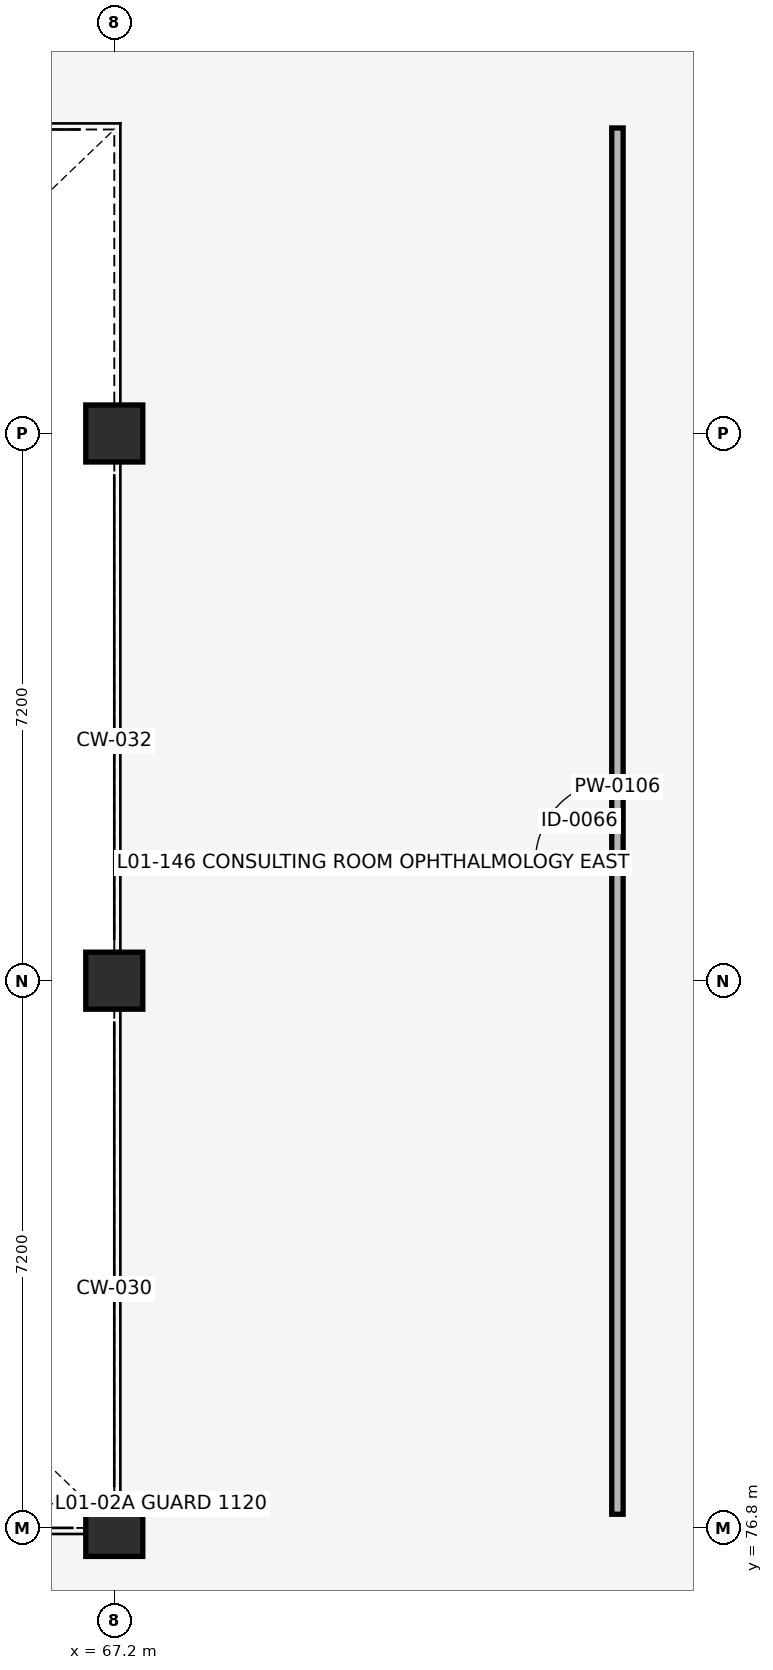
"""IFC4 building model, lengths in metres.
Left out: names, types, materials, properties, quantities, classifications, styles, units other than length and angle.
Written with IfcOpenShell. Run it as: python <this file> out.ifc"""

import sys

from ifc_helpers import new_model, si_unit, direction, frame, frame_2d, origin, origin_2d, place, context, subcontext, project, spatial, rectangle, extrude, element, fill, save


model = new_model("IFC4")
c1 = context("Model", 3, precision=1e-05, world=origin(), true_north=direction((0.0, 1.0)))
c2 = subcontext(c1, "Body", "Model", "MODEL_VIEW")
j1 = project(units=[si_unit("LENGTHUNIT", "METRE"), si_unit("PLANEANGLEUNIT", "RADIAN")], contexts=[c1])
p1 = place(None, origin())
s1 = spatial("IfcSite", under=j1, at=p1, CompositionType="ELEMENT")
p2 = place(p1, origin())
s2 = spatial("IfcBuilding", under=s1, at=p2, CompositionType="ELEMENT")
p3 = place(p2, frame((0.0, 0.0, 4.42)))
s3 = spatial("IfcBuildingStorey", under=s2, at=p3, CompositionType="ELEMENT", Elevation=4.42)
for number, where, z_axis, x_axis in (
    (1, (67.2, 76.8, 0.0), (0.0, 0.0, 1.0), (1.0, 0.0, 0.0)),
    (2, (67.2, 84.0, 0.0), (0.0, 0.0, 1.0), (1.0, 0.0, 0.0)),
    (3, (67.2, 91.2, 0.0), (0.0, 0.0, 1.0), (1.0, 0.0, 0.0)),
):
    element("IfcColumn", number, at=place(p3, frame(where, z_axis=z_axis, x_axis=x_axis)), inside=s3, PredefinedType="COLUMN", context=c2, shape_type="SweptSolid", body=[
        extrude(rectangle(XDim=0.75, YDim=0.75, at=origin_2d()), origin(), (0.0, 0.0, 1.0), 4.08),
    ])
p4 = place(p3, frame((73.82, 76.98, 0.0), z_axis=(0.0, 0.0, 1.0), x_axis=(0.0, 1.0, 0.0)))
e4 = element("IfcWall", 4, at=p4, inside=s3, PredefinedType="PARTITIONING", context=c2, shape_type="SweptSolid", body=[
    extrude(rectangle(XDim=18.24, YDim=0.15, at=frame_2d((9.12, 0.0))), origin(), (0.0, 0.0, 1.0), 3.12),
])
p5 = place(p4, frame((8.58, 0.0, 0.0)))
e5 = element("IfcOpeningElement", 5, at=p5, cuts=e4, PredefinedType="OPENING", context=c2, shape_type="SweptSolid", body=[
    extrude(rectangle(XDim=1.08, YDim=2.1, at=frame_2d((0.54, 1.05))), frame((0.0, 0.085, 0.0), z_axis=(0.0, -1.0, 0.0), x_axis=(1.0, 0.0, 0.0)), (0.0, 0.0, 1.0), 0.17),
])
p6 = place(p5, origin())
e6 = element("IfcDoor", 6, at=p6, inside=s3, OperationType="SINGLE_SWING_LEFT", PredefinedType="DOOR", context=c2, shape_type="SweptSolid", body=[
    extrude(rectangle(XDim=1.08, YDim=2.1, at=frame_2d((0.54, 1.05))), frame((0.0, 0.025, 0.0), z_axis=(0.0, -1.0, 0.0), x_axis=(1.0, 0.0, 0.0)), (0.0, 0.0, 1.0), 0.05),
])
fill(e5, e6)
save(model, sys.argv[1])
